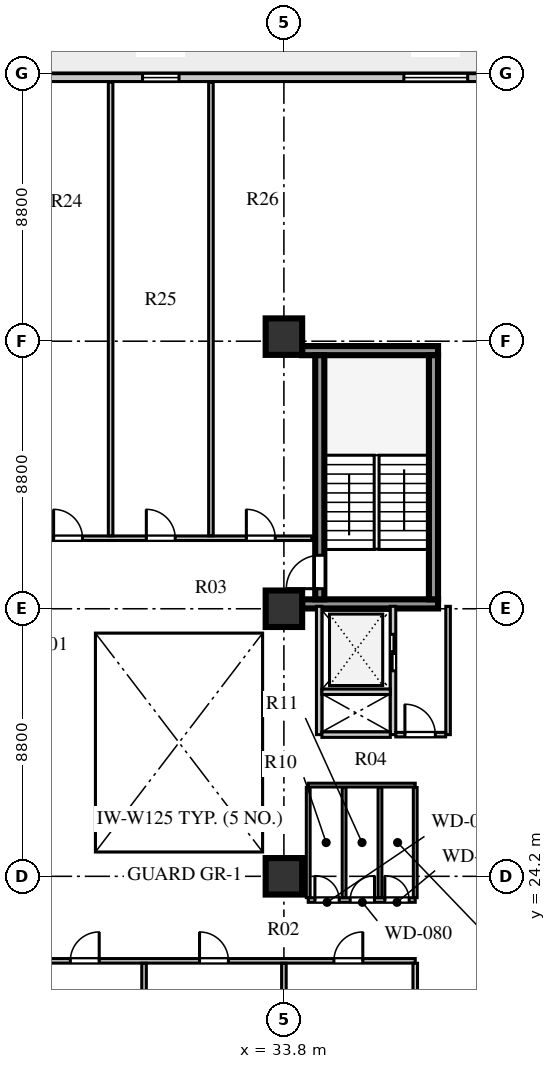
"""IFC4 building model, lengths in metres.
Left out: names, types, materials, properties, quantities, classifications, styles, units other than length and angle.
Written with IfcOpenShell. Run it as: python <this file> out.ifc"""

import sys

from ifc_helpers import new_model, si_unit, direction, frame, frame_2d, origin, origin_2d, place, context, subcontext, project, spatial, rectangle, extrude, element, fill, save


model = new_model("IFC4")
c1 = context("Model", 3, precision=1e-05, world=origin(), true_north=direction((0.0, 1.0)))
c2 = subcontext(c1, "Body", "Model", "MODEL_VIEW")
j1 = project(units=[si_unit("LENGTHUNIT", "METRE"), si_unit("PLANEANGLEUNIT", "RADIAN")], contexts=[c1])
p1 = place(None, origin())
s1 = spatial("IfcSite", under=j1, at=p1, CompositionType="ELEMENT")
p2 = place(p1, origin())
s2 = spatial("IfcBuilding", under=s1, at=p2, CompositionType="ELEMENT")
p3 = place(p2, frame((0.0, 0.0, 50.0)))
s3 = spatial("IfcBuildingStorey", under=s2, at=p3, CompositionType="ELEMENT", Elevation=50.0)
for number, where, z_axis, x_axis in (
    (1, (34.4, 33.16, 0.0), (0.0, 0.0, 1.0), (1.0, 0.0, 0.0)),
    (2, (34.4, 41.49, 0.0), (0.0, 0.0, 1.0), (1.0, 0.0, 0.0)),
):
    element("IfcWall", number, at=place(p3, frame(where, z_axis=z_axis, x_axis=x_axis)), inside=s3, PredefinedType="SHEAR", context=c2, shape_type="SweptSolid", body=[
        extrude(rectangle(XDim=4.47, YDim=0.3, at=frame_2d((2.235, 0.0))), origin(), (0.0, 0.0, 1.0), 3.72),
    ])
p4 = place(p3, frame((34.98, 33.31, 0.0), z_axis=(0.0, 0.0, 1.0), x_axis=(0.0, 1.0, 0.0)))
e3 = element("IfcWall", 3, at=p4, inside=s3, PredefinedType="SHEAR", context=c2, shape_type="SweptSolid", body=[
    extrude(rectangle(XDim=8.03, YDim=0.3, at=frame_2d((4.015, 0.0))), origin(), (0.0, 0.0, 1.0), 3.72),
])
p5 = place(p4, frame((0.35, 0.0, 0.0)))
e4 = element("IfcOpeningElement", 4, at=p5, cuts=e3, PredefinedType="OPENING", context=c2, shape_type="SweptSolid", body=[
    extrude(rectangle(XDim=1.1, YDim=2.1, at=frame_2d((0.55, 1.05))), frame((0.0, 0.16, 0.0), z_axis=(0.0, -1.0, 0.0), x_axis=(1.0, 0.0, 0.0)), (0.0, 0.0, 1.0), 0.32),
])
p6 = place(p3, frame((38.72, 33.31, 0.0), z_axis=(0.0, 0.0, 1.0), x_axis=(0.0, 1.0, 0.0)))
e5 = element("IfcWall", 5, at=p6, inside=s3, PredefinedType="SHEAR", context=c2, shape_type="SweptSolid", body=[
    extrude(rectangle(XDim=8.03, YDim=0.3, at=frame_2d((4.015, 0.0))), origin(), (0.0, 0.0, 1.0), 3.72),
])
for number, where, z_axis, x_axis in (
    (6, (33.8, 24.2, 0.0), (0.0, 0.0, 1.0), (1.0, 0.0, 0.0)),
    (7, (33.8, 33.0, 0.0), (0.0, 0.0, 1.0), (1.0, 0.0, 0.0)),
    (8, (33.8, 41.95, 0.0), (0.0, 0.0, 1.0), (1.0, 0.0, 0.0)),
):
    element("IfcColumn", number, at=place(p3, frame(where, z_axis=z_axis, x_axis=x_axis)), inside=s3, PredefinedType="COLUMN", context=c2, shape_type="SweptSolid", body=[
        extrude(rectangle(XDim=1.2, YDim=1.2, at=origin_2d()), origin(), (0.0, 0.0, 1.0), 3.72),
    ])
p7 = place(p3, frame((46.3, 50.47, 0.0), z_axis=(0.0, 0.0, 1.0), x_axis=(-1.0, 0.0, 0.0)))
e9 = element("IfcWall", 9, at=p7, inside=s3, PredefinedType="SOLIDWALL", context=c2, shape_type="SweptSolid", body=[
    extrude(rectangle(XDim=34.0, YDim=0.26, at=frame_2d((17.0, 0.0))), origin(), (0.0, 0.0, 1.0), 3.72),
])
p8 = place(p7, frame((32.05, 0.0, 0.0)))
e10 = element("IfcOpeningElement", 10, at=p8, cuts=e9, PredefinedType="OPENING", context=c2, shape_type="SweptSolid", body=[
    extrude(rectangle(XDim=1.0, YDim=2.05, at=frame_2d((0.5, 1.025))), frame((0.0, 0.14, 0.0), z_axis=(0.0, -1.0, 0.0), x_axis=(1.0, 0.0, 0.0)), (0.0, 0.0, 1.0), 0.28),
])
p9 = place(p7, frame((24.67, 0.0, 0.8)))
e11 = element("IfcOpeningElement", 11, at=p9, cuts=e9, PredefinedType="OPENING", context=c2, shape_type="SweptSolid", body=[
    extrude(rectangle(XDim=1.2, YDim=1.75, at=frame_2d((0.6, 0.875))), frame((0.0, 0.14, 0.0), z_axis=(0.0, -1.0, 0.0), x_axis=(1.0, 0.0, 0.0)), (0.0, 0.0, 1.0), 0.28),
])
p10 = place(p7, frame((15.95, 0.0, 0.8)))
e12 = element("IfcOpeningElement", 12, at=p10, cuts=e9, PredefinedType="OPENING", context=c2, shape_type="SweptSolid", body=[
    extrude(rectangle(XDim=1.2, YDim=1.75, at=frame_2d((0.6, 0.875))), frame((0.0, 0.14, 0.0), z_axis=(0.0, -1.0, 0.0), x_axis=(1.0, 0.0, 0.0)), (0.0, 0.0, 1.0), 0.28),
])
p11 = place(p7, frame((6.455, 0.0, 0.8)))
e13 = element("IfcOpeningElement", 13, at=p11, cuts=e9, PredefinedType="OPENING", context=c2, shape_type="SweptSolid", body=[
    extrude(rectangle(XDim=2.1, YDim=1.95, at=frame_2d((1.05, 0.975))), frame((0.0, 0.14, 0.0), z_axis=(0.0, -1.0, 0.0), x_axis=(1.0, 0.0, 0.0)), (0.0, 0.0, 1.0), 0.28),
])
p12 = place(p3, frame((34.96, 28.86, 0.0), z_axis=(0.0, 0.0, 1.0), x_axis=(0.0, 1.0, 0.0)))
e14 = element("IfcWall", 14, at=p12, inside=s3, PredefinedType="SOLIDWALL", context=c2, shape_type="SweptSolid", body=[
    extrude(rectangle(XDim=4.22, YDim=0.18, at=frame_2d((2.11, 0.0))), origin(), (0.0, 0.0, 1.0), 3.72),
])
p13 = place(p3, frame((37.39, 28.86, 0.0), z_axis=(0.0, 0.0, 1.0), x_axis=(0.0, 1.0, 0.0)))
e15 = element("IfcWall", 15, at=p13, inside=s3, PredefinedType="SOLIDWALL", context=c2, shape_type="SweptSolid", body=[
    extrude(rectangle(XDim=4.22, YDim=0.18, at=frame_2d((2.11, 0.0))), origin(), (0.0, 0.0, 1.0), 3.72),
])
p14 = place(p13, frame((2.1, 0.0, 0.0)))
e16 = element("IfcOpeningElement", 16, at=p14, cuts=e15, PredefinedType="OPENING", context=c2, shape_type="SweptSolid", body=[
    extrude(rectangle(XDim=1.2, YDim=2.12, at=frame_2d((0.6, 1.06))), frame((0.0, 0.1, 0.0), z_axis=(0.0, -1.0, 0.0), x_axis=(1.0, 0.0, 0.0)), (0.0, 0.0, 1.0), 0.2),
])
for number, where, z_axis, x_axis in (
    (17, (35.05, 28.86, 0.0), (0.0, 0.0, 1.0), (1.0, 0.0, 0.0)),
    (18, (35.05, 30.27, 0.0), (0.0, 0.0, 1.0), (1.0, 0.0, 0.0)),
):
    element("IfcWall", number, at=place(p3, frame(where, z_axis=z_axis, x_axis=x_axis)), inside=s3, PredefinedType="SOLIDWALL", context=c2, shape_type="SweptSolid", body=[
        extrude(rectangle(XDim=2.25, YDim=0.18, at=frame_2d((1.125, 0.0))), origin(), (0.0, 0.0, 1.0), 3.72),
    ])
p15 = place(p3, frame((39.2, 28.86, 0.0), z_axis=(0.0, 0.0, 1.0), x_axis=(0.0, 1.0, 0.0)))
e19 = element("IfcWall", 19, at=p15, inside=s3, PredefinedType="PARTITIONING", context=c2, shape_type="SweptSolid", body=[
    extrude(rectangle(XDim=4.22, YDim=0.15, at=frame_2d((2.11, 0.0))), origin(), (0.0, 0.0, 1.0), 3.72),
])
p16 = place(p3, frame((37.48, 28.86, 0.0), z_axis=(0.0, 0.0, 1.0), x_axis=(1.0, 0.0, 0.0)))
e20 = element("IfcWall", 20, at=p16, inside=s3, PredefinedType="PARTITIONING", context=c2, shape_type="SweptSolid", body=[
    extrude(rectangle(XDim=1.64, YDim=0.15, at=frame_2d((0.82, 0.0))), origin(), (0.0, 0.0, 1.0), 3.72),
])
p17 = place(p16, frame((0.3, 0.0, 0.0)))
e21 = element("IfcOpeningElement", 21, at=p17, cuts=e20, PredefinedType="OPENING", context=c2, shape_type="SweptSolid", body=[
    extrude(rectangle(XDim=1.0, YDim=2.1, at=frame_2d((0.5, 1.05))), frame((0.0, 0.085, 0.0), z_axis=(0.0, -1.0, 0.0), x_axis=(1.0, 0.0, 0.0)), (0.0, 0.0, 1.0), 0.17),
])
p18 = place(p3, frame((25.25, 21.42, 0.0), z_axis=(0.0, 0.0, 1.0), x_axis=(1.0, 0.0, 0.0)))
e22 = element("IfcWall", 22, at=p18, inside=s3, PredefinedType="PARTITIONING", context=c2, shape_type="SweptSolid", body=[
    extrude(rectangle(XDim=12.87, YDim=0.15, at=frame_2d((6.435, 0.0))), origin(), (0.0, 0.0, 1.0), 3.32),
])
p19 = place(p18, frame((1.525, 0.0, 0.0)))
e23 = element("IfcOpeningElement", 23, at=p19, cuts=e22, PredefinedType="OPENING", context=c2, shape_type="SweptSolid", body=[
    extrude(rectangle(XDim=0.95, YDim=2.08, at=frame_2d((0.475, 1.04))), frame((0.0, 0.085, 0.0), z_axis=(0.0, -1.0, 0.0), x_axis=(1.0, 0.0, 0.0)), (0.0, 0.0, 1.0), 0.17),
])
p20 = place(p18, frame((5.775, 0.0, 0.0)))
e24 = element("IfcOpeningElement", 24, at=p20, cuts=e22, PredefinedType="OPENING", context=c2, shape_type="SweptSolid", body=[
    extrude(rectangle(XDim=0.95, YDim=2.08, at=frame_2d((0.475, 1.04))), frame((0.0, 0.085, 0.0), z_axis=(0.0, -1.0, 0.0), x_axis=(1.0, 0.0, 0.0)), (0.0, 0.0, 1.0), 0.17),
])
p21 = place(p18, frame((10.195, 0.0, 0.0)))
e25 = element("IfcOpeningElement", 25, at=p21, cuts=e22, PredefinedType="OPENING", context=c2, shape_type="SweptSolid", body=[
    extrude(rectangle(XDim=0.95, YDim=2.08, at=frame_2d((0.475, 1.04))), frame((0.0, 0.085, 0.0), z_axis=(0.0, -1.0, 0.0), x_axis=(1.0, 0.0, 0.0)), (0.0, 0.0, 1.0), 0.17),
])
p22 = place(p3, frame((38.12, 6.88, 0.0), z_axis=(0.0, 0.0, 1.0), x_axis=(0.0, 1.0, 0.0)))
e26 = element("IfcWall", 26, at=p22, inside=s3, PredefinedType="PARTITIONING", context=c2, shape_type="SweptSolid", body=[
    extrude(rectangle(XDim=14.46, YDim=0.15, at=frame_2d((7.23, 0.0))), origin(), (0.0, 0.0, 1.0), 3.72),
])
p23 = place(p3, frame((34.6, 23.42, 0.0), z_axis=(0.0, 0.0, 1.0), x_axis=(1.0, 0.0, 0.0)))
e27 = element("IfcWall", 27, at=p23, inside=s3, PredefinedType="PARTITIONING", context=c2, shape_type="SweptSolid", body=[
    extrude(rectangle(XDim=3.52, YDim=0.15, at=frame_2d((1.76, 0.0))), origin(), (0.0, 0.0, 1.0), 3.72),
])
p24 = place(p23, frame((0.22, 0.0, 0.0)))
e28 = element("IfcOpeningElement", 28, at=p24, cuts=e27, PredefinedType="OPENING", context=c2, shape_type="SweptSolid", body=[
    extrude(rectangle(XDim=0.8, YDim=2.05, at=frame_2d((0.4, 1.025))), frame((0.0, 0.085, 0.0), z_axis=(0.0, -1.0, 0.0), x_axis=(1.0, 0.0, 0.0)), (0.0, 0.0, 1.0), 0.17),
])
p25 = place(p23, frame((1.38, 0.0, 0.0)))
e29 = element("IfcOpeningElement", 29, at=p25, cuts=e27, PredefinedType="OPENING", context=c2, shape_type="SweptSolid", body=[
    extrude(rectangle(XDim=0.8, YDim=2.05, at=frame_2d((0.4, 1.025))), frame((0.0, 0.085, 0.0), z_axis=(0.0, -1.0, 0.0), x_axis=(1.0, 0.0, 0.0)), (0.0, 0.0, 1.0), 0.17),
])
p26 = place(p23, frame((2.52, 0.0, 0.0)))
e30 = element("IfcOpeningElement", 30, at=p26, cuts=e27, PredefinedType="OPENING", context=c2, shape_type="SweptSolid", body=[
    extrude(rectangle(XDim=0.8, YDim=2.05, at=frame_2d((0.4, 1.025))), frame((0.0, 0.085, 0.0), z_axis=(0.0, -1.0, 0.0), x_axis=(1.0, 0.0, 0.0)), (0.0, 0.0, 1.0), 0.17),
])
p27 = place(p3, frame((25.25, 35.32, 0.0), z_axis=(0.0, 0.0, 1.0), x_axis=(1.0, 0.0, 0.0)))
e31 = element("IfcWall", 31, at=p27, inside=s3, PredefinedType="PARTITIONING", context=c2, shape_type="SweptSolid", body=[
    extrude(rectangle(XDim=9.47, YDim=0.15, at=frame_2d((4.735, 0.0))), origin(), (0.0, 0.0, 1.0), 3.72),
])
p28 = place(p27, frame((0.975, 0.0, 0.0)))
e32 = element("IfcOpeningElement", 32, at=p28, cuts=e31, PredefinedType="OPENING", context=c2, shape_type="SweptSolid", body=[
    extrude(rectangle(XDim=0.95, YDim=2.08, at=frame_2d((0.475, 1.04))), frame((0.0, 0.085, 0.0), z_axis=(0.0, -1.0, 0.0), x_axis=(1.0, 0.0, 0.0)), (0.0, 0.0, 1.0), 0.17),
])
p29 = place(p27, frame((4.025, 0.0, 0.0)))
e33 = element("IfcOpeningElement", 33, at=p29, cuts=e31, PredefinedType="OPENING", context=c2, shape_type="SweptSolid", body=[
    extrude(rectangle(XDim=0.95, YDim=2.08, at=frame_2d((0.475, 1.04))), frame((0.0, 0.085, 0.0), z_axis=(0.0, -1.0, 0.0), x_axis=(1.0, 0.0, 0.0)), (0.0, 0.0, 1.0), 0.17),
])
p30 = place(p27, frame((7.315, 0.0, 0.0)))
e34 = element("IfcOpeningElement", 34, at=p30, cuts=e31, PredefinedType="OPENING", context=c2, shape_type="SweptSolid", body=[
    extrude(rectangle(XDim=0.95, YDim=2.08, at=frame_2d((0.475, 1.04))), frame((0.0, 0.085, 0.0), z_axis=(0.0, -1.0, 0.0), x_axis=(1.0, 0.0, 0.0)), (0.0, 0.0, 1.0), 0.17),
])
p31 = place(p3, frame((34.6, 27.2, 0.0), z_axis=(0.0, 0.0, 1.0), x_axis=(1.0, 0.0, 0.0)))
e35 = element("IfcWall", 35, at=p31, inside=s3, PredefinedType="PLUMBINGWALL", context=c2, shape_type="SweptSolid", body=[
    extrude(rectangle(XDim=3.52, YDim=0.125, at=frame_2d((1.76, 0.0))), origin(), (0.0, 0.0, 1.0), 3.32),
])
for number, where, z_axis, x_axis in (
    (36, (34.6, 23.5, 0.0), (0.0, 0.0, 1.0), (0.0, 1.0, 0.0)),
    (37, (38.12, 23.5, 0.0), (0.0, 0.0, 1.0), (0.0, 1.0, 0.0)),
    (38, (35.78, 23.5, 0.0), (0.0, 0.0, 1.0), (0.0, 1.0, 0.0)),
    (39, (36.96, 23.5, 0.0), (0.0, 0.0, 1.0), (0.0, 1.0, 0.0)),
):
    element("IfcWall", number, at=place(p3, frame(where, z_axis=z_axis, x_axis=x_axis)), inside=s3, PredefinedType="PLUMBINGWALL", context=c2, shape_type="SweptSolid", body=[
        extrude(rectangle(XDim=3.62, YDim=0.125, at=frame_2d((1.81, 0.0))), origin(), (0.0, 0.0, 1.0), 3.72),
    ])
p32 = place(p3, frame((29.2, 6.88, 0.0), z_axis=(0.0, 0.0, 1.0), x_axis=(0.0, 1.0, 0.0)))
e40 = element("IfcWall", 40, at=p32, inside=s3, PredefinedType="PARTITIONING", context=c2, shape_type="SweptSolid", body=[
    extrude(rectangle(XDim=14.46, YDim=0.15, at=frame_2d((7.23, 0.0))), origin(), (0.0, 0.0, 1.0), 3.72),
])
p33 = place(p3, frame((33.8, 6.88, 0.0), z_axis=(0.0, 0.0, 1.0), x_axis=(0.0, 1.0, 0.0)))
e41 = element("IfcWall", 41, at=p33, inside=s3, PredefinedType="PARTITIONING", context=c2, shape_type="SweptSolid", body=[
    extrude(rectangle(XDim=14.46, YDim=0.15, at=frame_2d((7.23, 0.0))), origin(), (0.0, 0.0, 1.0), 3.02),
])
for number, where, z_axis, x_axis in (
    (42, (28.1, 35.4, 0.0), (0.0, 0.0, 1.0), (0.0, 1.0, 0.0)),
    (43, (31.4, 35.4, 0.0), (0.0, 0.0, 1.0), (0.0, 1.0, 0.0)),
):
    element("IfcWall", number, at=place(p3, frame(where, z_axis=z_axis, x_axis=x_axis)), inside=s3, PredefinedType="PARTITIONING", context=c2, shape_type="SweptSolid", body=[
        extrude(rectangle(XDim=14.92, YDim=0.15, at=frame_2d((7.46, 0.0))), origin(), (0.0, 0.0, 1.0), 3.72),
    ])
p34 = place(p10, origin())
e44 = element("IfcWindow", 44, at=p34, inside=s3, PartitioningType="SINGLE_PANEL", PredefinedType="WINDOW", context=c2, shape_type="SweptSolid", body=[
    extrude(rectangle(XDim=1.2, YDim=1.75, at=frame_2d((0.6, 0.875))), frame((0.0, 0.03, 0.0), z_axis=(0.0, -1.0, 0.0), x_axis=(1.0, 0.0, 0.0)), (0.0, 0.0, 1.0), 0.06),
])
fill(e12, e44)
p35 = place(p11, origin())
e45 = element("IfcWindow", 45, at=p35, inside=s3, PartitioningType="SINGLE_PANEL", PredefinedType="WINDOW", context=c2, shape_type="SweptSolid", body=[
    extrude(rectangle(XDim=2.1, YDim=1.95, at=frame_2d((1.05, 0.975))), frame((0.0, 0.03, 0.0), z_axis=(0.0, -1.0, 0.0), x_axis=(1.0, 0.0, 0.0)), (0.0, 0.0, 1.0), 0.06),
])
fill(e13, e45)
p36 = place(p5, origin())
e46 = element("IfcDoor", 46, at=p36, inside=s3, OperationType="SINGLE_SWING_LEFT", PredefinedType="DOOR", context=c2, shape_type="SweptSolid", body=[
    extrude(rectangle(XDim=1.1, YDim=2.1, at=frame_2d((0.55, 1.05))), frame((0.0, 0.025, 0.0), z_axis=(0.0, -1.0, 0.0), x_axis=(1.0, 0.0, 0.0)), (0.0, 0.0, 1.0), 0.05),
])
fill(e4, e46)
p37 = place(p14, frame((1.2, 0.0, 0.0), z_axis=(0.0, 0.0, 1.0), x_axis=(-1.0, 0.0, 0.0)))
e47 = element("IfcDoor", 47, at=p37, inside=s3, OperationType="DOUBLE_DOOR_SLIDING", PredefinedType="DOOR", context=c2, shape_type="SweptSolid", body=[
    extrude(rectangle(XDim=1.2, YDim=2.12, at=frame_2d((0.6, 1.06))), frame((0.0, 0.025, 0.0), z_axis=(0.0, -1.0, 0.0), x_axis=(1.0, 0.0, 0.0)), (0.0, 0.0, 1.0), 0.05),
])
fill(e16, e47)
p38 = place(p17, origin())
e48 = element("IfcDoor", 48, at=p38, inside=s3, OperationType="SINGLE_SWING_LEFT", PredefinedType="DOOR", context=c2, shape_type="SweptSolid", body=[
    extrude(rectangle(XDim=1.0, YDim=2.1, at=frame_2d((0.5, 1.05))), frame((0.0, 0.025, 0.0), z_axis=(0.0, -1.0, 0.0), x_axis=(1.0, 0.0, 0.0)), (0.0, 0.0, 1.0), 0.05),
])
fill(e21, e48)
p39 = place(p24, origin())
e49 = element("IfcDoor", 49, at=p39, inside=s3, OperationType="SINGLE_SWING_LEFT", PredefinedType="DOOR", context=c2, shape_type="SweptSolid", body=[
    extrude(rectangle(XDim=0.8, YDim=2.05, at=frame_2d((0.4, 1.025))), frame((0.0, 0.025, 0.0), z_axis=(0.0, -1.0, 0.0), x_axis=(1.0, 0.0, 0.0)), (0.0, 0.0, 1.0), 0.05),
])
fill(e28, e49)
p40 = place(p25, origin())
e50 = element("IfcDoor", 50, at=p40, inside=s3, OperationType="SINGLE_SWING_RIGHT", PredefinedType="DOOR", context=c2, shape_type="SweptSolid", body=[
    extrude(rectangle(XDim=0.8, YDim=2.05, at=frame_2d((0.4, 1.025))), frame((0.0, 0.025, 0.0), z_axis=(0.0, -1.0, 0.0), x_axis=(1.0, 0.0, 0.0)), (0.0, 0.0, 1.0), 0.05),
])
fill(e29, e50)
p41 = place(p26, origin())
e51 = element("IfcDoor", 51, at=p41, inside=s3, OperationType="SINGLE_SWING_LEFT", PredefinedType="DOOR", context=c2, shape_type="SweptSolid", body=[
    extrude(rectangle(XDim=0.8, YDim=2.05, at=frame_2d((0.4, 1.025))), frame((0.0, 0.025, 0.0), z_axis=(0.0, -1.0, 0.0), x_axis=(1.0, 0.0, 0.0)), (0.0, 0.0, 1.0), 0.05),
])
fill(e30, e51)
p42 = place(p19, frame((0.95, 0.0, 0.0), z_axis=(0.0, 0.0, 1.0), x_axis=(-1.0, 0.0, 0.0)))
e52 = element("IfcDoor", 52, at=p42, inside=s3, OperationType="SINGLE_SWING_LEFT", PredefinedType="DOOR", context=c2, shape_type="SweptSolid", body=[
    extrude(rectangle(XDim=0.95, YDim=2.08, at=frame_2d((0.475, 1.04))), frame((0.0, 0.025, 0.0), z_axis=(0.0, -1.0, 0.0), x_axis=(1.0, 0.0, 0.0)), (0.0, 0.0, 1.0), 0.05),
])
fill(e23, e52)
p43 = place(p20, frame((0.95, 0.0, 0.0), z_axis=(0.0, 0.0, 1.0), x_axis=(-1.0, 0.0, 0.0)))
e53 = element("IfcDoor", 53, at=p43, inside=s3, OperationType="SINGLE_SWING_RIGHT", PredefinedType="DOOR", context=c2, shape_type="SweptSolid", body=[
    extrude(rectangle(XDim=0.95, YDim=2.08, at=frame_2d((0.475, 1.04))), frame((0.0, 0.025, 0.0), z_axis=(0.0, -1.0, 0.0), x_axis=(1.0, 0.0, 0.0)), (0.0, 0.0, 1.0), 0.05),
])
fill(e24, e53)
p44 = place(p21, frame((0.95, 0.0, 0.0), z_axis=(0.0, 0.0, 1.0), x_axis=(-1.0, 0.0, 0.0)))
e54 = element("IfcDoor", 54, at=p44, inside=s3, OperationType="SINGLE_SWING_LEFT", PredefinedType="DOOR", context=c2, shape_type="SweptSolid", body=[
    extrude(rectangle(XDim=0.95, YDim=2.08, at=frame_2d((0.475, 1.04))), frame((0.0, 0.025, 0.0), z_axis=(0.0, -1.0, 0.0), x_axis=(1.0, 0.0, 0.0)), (0.0, 0.0, 1.0), 0.05),
])
fill(e25, e54)
p45 = place(p28, origin())
e55 = element("IfcDoor", 55, at=p45, inside=s3, OperationType="SINGLE_SWING_LEFT", PredefinedType="DOOR", context=c2, shape_type="SweptSolid", body=[
    extrude(rectangle(XDim=0.95, YDim=2.08, at=frame_2d((0.475, 1.04))), frame((0.0, 0.025, 0.0), z_axis=(0.0, -1.0, 0.0), x_axis=(1.0, 0.0, 0.0)), (0.0, 0.0, 1.0), 0.05),
])
fill(e32, e55)
p46 = place(p29, origin())
e56 = element("IfcDoor", 56, at=p46, inside=s3, OperationType="SINGLE_SWING_LEFT", PredefinedType="DOOR", context=c2, shape_type="SweptSolid", body=[
    extrude(rectangle(XDim=0.95, YDim=2.08, at=frame_2d((0.475, 1.04))), frame((0.0, 0.025, 0.0), z_axis=(0.0, -1.0, 0.0), x_axis=(1.0, 0.0, 0.0)), (0.0, 0.0, 1.0), 0.05),
])
fill(e33, e56)
p47 = place(p30, origin())
e57 = element("IfcDoor", 57, at=p47, inside=s3, OperationType="SINGLE_SWING_LEFT", PredefinedType="DOOR", context=c2, shape_type="SweptSolid", body=[
    extrude(rectangle(XDim=0.95, YDim=2.08, at=frame_2d((0.475, 1.04))), frame((0.0, 0.025, 0.0), z_axis=(0.0, -1.0, 0.0), x_axis=(1.0, 0.0, 0.0)), (0.0, 0.0, 1.0), 0.05),
])
fill(e34, e57)
save(model, sys.argv[1])
